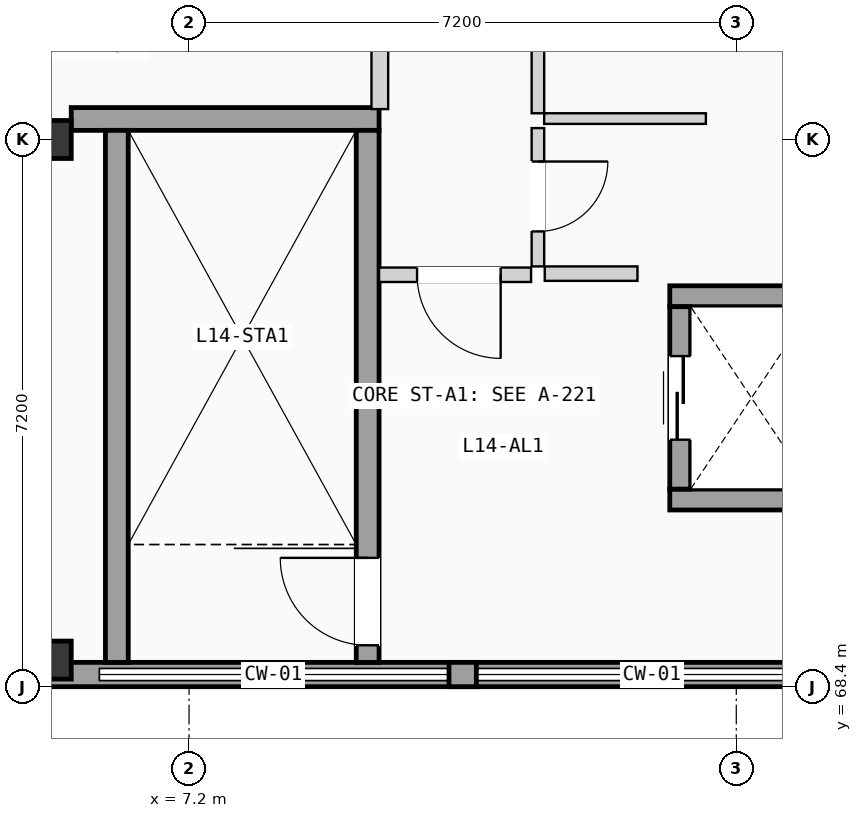
"""IFC4 building model, lengths in metres.
Left out: names, types, materials, properties, quantities, classifications, styles, units other than length and angle.
Written with IfcOpenShell. Run it as: python <this file> out.ifc"""

import sys

from ifc_helpers import new_model, si_unit, direction, frame, frame_2d, origin, origin_2d, place, context, subcontext, project, spatial, rectangle, extrude, element, fill, save


model = new_model("IFC4")
c1 = context("Model", 3, precision=1e-05, world=origin(), true_north=direction((0.0, 1.0)))
c2 = subcontext(c1, "Body", "Model", "MODEL_VIEW")
j1 = project(units=[si_unit("LENGTHUNIT", "METRE"), si_unit("PLANEANGLEUNIT", "RADIAN")], contexts=[c1])
p1 = place(None, origin())
s1 = spatial("IfcSite", under=j1, at=p1, CompositionType="ELEMENT")
p2 = place(p1, origin())
s2 = spatial("IfcBuilding", under=s1, at=p2, CompositionType="ELEMENT")
p3 = place(p2, frame((0.0, 0.0, 46.725)))
s3 = spatial("IfcBuildingStorey", under=s2, at=p3, CompositionType="ELEMENT", Elevation=46.725)
for number, where, z_axis, x_axis in (
    (1, (5.4, 68.75, 0.0), (0.0, 0.0, 1.0), (1.0, 0.0, 0.0)),
    (2, (5.4, 75.6, 0.0), (0.0, 0.0, 1.0), (1.0, 0.0, 0.0)),
):
    element("IfcColumn", number, at=place(p3, frame(where, z_axis=z_axis, x_axis=x_axis)), inside=s3, PredefinedType="COLUMN", context=c2, shape_type="SweptSolid", body=[
        extrude(rectangle(XDim=0.5, YDim=0.5, at=origin_2d()), origin(), (0.0, 0.0, 1.0), 2.85),
    ])
p4 = place(p3, frame((4.8, 68.56, 0.0), z_axis=(0.0, 0.0, 1.0), x_axis=(1.0, 0.0, 0.0)))
e3 = element("IfcWall", 3, at=p4, inside=s3, PredefinedType="SOLIDWALL", context=c2, shape_type="SweptSolid", body=[
    extrude(rectangle(XDim=12.0, YDim=0.32, at=frame_2d((6.0, 0.0))), origin(), (0.0, 0.0, 1.0), 1.11),
])
p5 = place(p3, frame((10.62, 68.56, 1.11), z_axis=(0.0, 0.0, 1.0), x_axis=(1.0, 0.0, 0.0)))
e4 = element("IfcWall", 4, at=p5, inside=s3, PredefinedType="SOLIDWALL", context=c2, shape_type="SweptSolid", body=[
    extrude(rectangle(XDim=0.36, YDim=0.32, at=frame_2d((0.18, 0.0))), origin(), (0.0, 0.0, 1.0), 1.44),
])
p6 = place(p3, frame((5.65, 75.87, 0.0), z_axis=(0.0, 0.0, 1.0), x_axis=(1.0, 0.0, 0.0)))
e5 = element("IfcWall", 5, at=p6, inside=s3, PredefinedType="SHEAR", context=c2, shape_type="SweptSolid", body=[
    extrude(rectangle(XDim=4.05, YDim=0.3, at=frame_2d((2.025, 0.0))), origin(), (0.0, 0.0, 1.0), 2.55),
])
p7 = place(p3, frame((6.25, 68.72, 0.0), z_axis=(0.0, 0.0, 1.0), x_axis=(0.0, 1.0, 0.0)))
e6 = element("IfcWall", 6, at=p7, inside=s3, PredefinedType="SHEAR", context=c2, shape_type="SweptSolid", body=[
    extrude(rectangle(XDim=7.0, YDim=0.3, at=frame_2d((3.5, 0.0))), origin(), (0.0, 0.0, 1.0), 2.55),
])
p8 = place(p3, frame((9.55, 68.72, 0.0), z_axis=(0.0, 0.0, 1.0), x_axis=(0.0, 1.0, 0.0)))
e7 = element("IfcWall", 7, at=p8, inside=s3, PredefinedType="SHEAR", context=c2, shape_type="SweptSolid", body=[
    extrude(rectangle(XDim=7.0, YDim=0.3, at=frame_2d((3.5, 0.0))), origin(), (0.0, 0.0, 1.0), 2.55),
])
p9 = place(p8, frame((0.225, 0.0, 0.0)))
e8 = element("IfcOpeningElement", 8, at=p9, cuts=e7, PredefinedType="OPENING", context=c2, shape_type="SweptSolid", body=[
    extrude(rectangle(XDim=1.15, YDim=2.12, at=frame_2d((0.575, 1.06))), frame((0.0, 0.16, 0.0), z_axis=(0.0, -1.0, 0.0), x_axis=(1.0, 0.0, 0.0)), (0.0, 0.0, 1.0), 0.32),
])
for number, where, z_axis, x_axis in (
    (9, (13.525, 70.863, 0.0), (0.0, 0.0, 1.0), (1.0, 0.0, 0.0)),
    (10, (13.525, 73.538, 0.0), (0.0, 0.0, 1.0), (1.0, 0.0, 0.0)),
):
    element("IfcWall", number, at=place(p3, frame(where, z_axis=z_axis, x_axis=x_axis)), inside=s3, PredefinedType="SHEAR", context=c2, shape_type="SweptSolid", body=[
        extrude(rectangle(XDim=2.15, YDim=0.275, at=frame_2d((1.075, 0.0))), origin(), (0.0, 0.0, 1.0), 2.55),
    ])
p10 = place(p3, frame((13.663, 71.0, 0.0), z_axis=(0.0, 0.0, 1.0), x_axis=(0.0, 1.0, 0.0)))
e11 = element("IfcWall", 11, at=p10, inside=s3, PredefinedType="SHEAR", context=c2, shape_type="SweptSolid", body=[
    extrude(rectangle(XDim=2.4, YDim=0.275, at=frame_2d((1.2, 0.0))), origin(), (0.0, 0.0, 1.0), 2.55),
])
p11 = place(p10, frame((0.65, 0.0, 0.0)))
e12 = element("IfcOpeningElement", 12, at=p11, cuts=e11, PredefinedType="OPENING", context=c2, shape_type="SweptSolid", body=[
    extrude(rectangle(XDim=1.1, YDim=2.15, at=frame_2d((0.55, 1.075))), frame((0.0, 0.147, 0.0), z_axis=(0.0, -1.0, 0.0), x_axis=(1.0, 0.0, 0.0)), (0.0, 0.0, 1.0), 0.295),
])
p12 = place(p3, frame((11.88, 73.835, 0.0), z_axis=(0.0, 0.0, 1.0), x_axis=(1.0, 0.0, 0.0)))
e13 = element("IfcWall", 13, at=p12, inside=s3, PredefinedType="PARTITIONING", context=c2, shape_type="SweptSolid", body=[
    extrude(rectangle(XDim=1.22, YDim=0.19, at=frame_2d((0.61, 0.0))), origin(), (0.0, 0.0, 1.0), 2.39),
])
p13 = place(p3, frame((9.7, 73.82, 0.0), z_axis=(0.0, 0.0, 1.0), x_axis=(1.0, 0.0, 0.0)))
e14 = element("IfcWall", 14, at=p13, inside=s3, PredefinedType="PARTITIONING", context=c2, shape_type="SweptSolid", body=[
    extrude(rectangle(XDim=2.0, YDim=0.19, at=frame_2d((1.0, 0.0))), origin(), (0.0, 0.0, 1.0), 2.39),
])
p14 = place(p13, frame((0.5, 0.0, 0.0)))
e15 = element("IfcOpeningElement", 15, at=p14, cuts=e14, PredefinedType="OPENING", context=c2, shape_type="SweptSolid", body=[
    extrude(rectangle(XDim=1.1, YDim=2.12, at=frame_2d((0.55, 1.06))), frame((0.0, 0.105, 0.0), z_axis=(0.0, -1.0, 0.0), x_axis=(1.0, 0.0, 0.0)), (0.0, 0.0, 1.0), 0.21),
])
p15 = place(p3, frame((11.79, 73.93, 0.0), z_axis=(0.0, 0.0, 1.0), x_axis=(0.0, 1.0, 0.0)))
e16 = element("IfcWall", 16, at=p15, inside=s3, PredefinedType="PARTITIONING", context=c2, shape_type="SweptSolid", body=[
    extrude(rectangle(XDim=1.82, YDim=0.165, at=frame_2d((0.91, 0.0))), origin(), (0.0, 0.0, 1.0), 2.39),
])
p16 = place(p15, frame((0.46, 0.0, 0.0)))
e17 = element("IfcOpeningElement", 17, at=p16, cuts=e16, PredefinedType="OPENING", context=c2, shape_type="SweptSolid", body=[
    extrude(rectangle(XDim=0.92, YDim=2.04, at=frame_2d((0.46, 1.02))), frame((0.0, 0.093, 0.0), z_axis=(0.0, -1.0, 0.0), x_axis=(1.0, 0.0, 0.0)), (0.0, 0.0, 1.0), 0.185),
])
p17 = place(p3, frame((11.872, 75.875, 0.0), z_axis=(0.0, 0.0, 1.0), x_axis=(1.0, 0.0, 0.0)))
e18 = element("IfcWall", 18, at=p17, inside=s3, PredefinedType="PARTITIONING", context=c2, shape_type="SweptSolid", body=[
    extrude(rectangle(XDim=2.128, YDim=0.14, at=frame_2d((1.064, 0.0))), origin(), (0.0, 0.0, 1.0), 2.12),
])
p18 = place(p3, frame((9.71, 76.0, 0.0), z_axis=(0.0, 0.0, 1.0), x_axis=(0.0, 1.0, 0.0)))
e19 = element("IfcWall", 19, at=p18, inside=s3, PredefinedType="PLUMBINGWALL", context=c2, shape_type="SweptSolid", body=[
    extrude(rectangle(XDim=2.22, YDim=0.22, at=frame_2d((1.11, 0.0))), origin(), (0.0, 0.0, 1.0), 2.39),
])
p19 = place(p3, frame((11.79, 75.945, 0.0), z_axis=(0.0, 0.0, 1.0), x_axis=(0.0, 1.0, 0.0)))
e20 = element("IfcWall", 20, at=p19, inside=s3, PredefinedType="PARTITIONING", context=c2, shape_type="SweptSolid", body=[
    extrude(rectangle(XDim=16.157, YDim=0.165, at=frame_2d((8.079, 0.0))), origin(), (0.0, 0.0, 1.0), 2.39),
])
p20 = place(p19, frame((7.616, 0.0, 0.0)))
e21 = element("IfcOpeningElement", 21, at=p20, cuts=e20, PredefinedType="OPENING", context=c2, shape_type="SweptSolid", body=[
    extrude(rectangle(XDim=0.98, YDim=2.08, at=frame_2d((0.49, 1.04))), frame((0.0, 0.093, 0.0), z_axis=(0.0, -1.0, 0.0), x_axis=(1.0, 0.0, 0.0)), (0.0, 0.0, 1.0), 0.185),
])
p21 = place(p9, origin())
e22 = element("IfcDoor", 22, at=p21, inside=s3, OperationType="SINGLE_SWING_RIGHT", PredefinedType="DOOR", context=c2, shape_type="SweptSolid", body=[
    extrude(rectangle(XDim=1.15, YDim=2.12, at=frame_2d((0.575, 1.06))), frame((0.0, 0.025, 0.0), z_axis=(0.0, -1.0, 0.0), x_axis=(1.0, 0.0, 0.0)), (0.0, 0.0, 1.0), 0.05),
])
fill(e8, e22)
p22 = place(p11, origin())
e23 = element("IfcDoor", 23, at=p22, inside=s3, OperationType="SLIDING_TO_LEFT", PredefinedType="DOOR", context=c2, shape_type="SweptSolid", body=[
    extrude(rectangle(XDim=1.1, YDim=2.15, at=frame_2d((0.55, 1.075))), frame((0.0, 0.025, 0.0), z_axis=(0.0, -1.0, 0.0), x_axis=(1.0, 0.0, 0.0)), (0.0, 0.0, 1.0), 0.05),
])
fill(e12, e23)
p23 = place(p14, frame((1.1, 0.0, 0.0), z_axis=(0.0, 0.0, 1.0), x_axis=(-1.0, 0.0, 0.0)))
e24 = element("IfcDoor", 24, at=p23, inside=s3, OperationType="SINGLE_SWING_RIGHT", PredefinedType="DOOR", context=c2, shape_type="SweptSolid", body=[
    extrude(rectangle(XDim=1.1, YDim=2.12, at=frame_2d((0.55, 1.06))), frame((0.0, 0.025, 0.0), z_axis=(0.0, -1.0, 0.0), x_axis=(1.0, 0.0, 0.0)), (0.0, 0.0, 1.0), 0.05),
])
fill(e15, e24)
p24 = place(p16, frame((0.92, 0.0, 0.0), z_axis=(0.0, 0.0, 1.0), x_axis=(-1.0, 0.0, 0.0)))
e25 = element("IfcDoor", 25, at=p24, inside=s3, OperationType="SINGLE_SWING_RIGHT", PredefinedType="DOOR", context=c2, shape_type="SweptSolid", body=[
    extrude(rectangle(XDim=0.92, YDim=2.04, at=frame_2d((0.46, 1.02))), frame((0.0, 0.025, 0.0), z_axis=(0.0, -1.0, 0.0), x_axis=(1.0, 0.0, 0.0)), (0.0, 0.0, 1.0), 0.05),
])
fill(e17, e25)
save(model, sys.argv[1])
